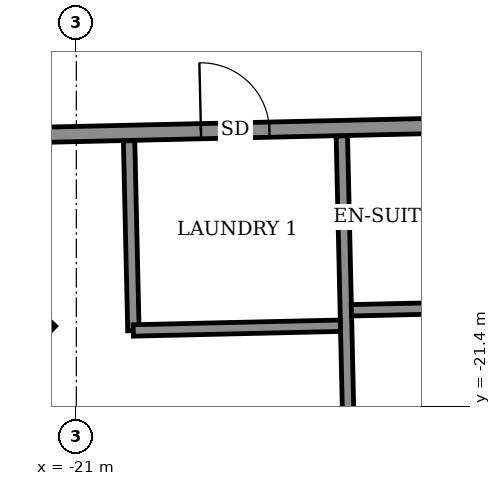
"""IFC4 building model, lengths in metres.
Left out: names, types, materials, properties, quantities, classifications, styles, units other than length and angle.
Written with IfcOpenShell. Run it as: python <this file> out.ifc"""

import sys

from ifc_helpers import new_model, si_unit, direction, frame, frame_2d, origin, origin_2d, place, context, subcontext, project, spatial, rectangle, extrude, element, fill, save


model = new_model("IFC4")
c1 = context("Model", 3, precision=1e-05, world=origin(), true_north=direction((0.0, 1.0)))
c2 = subcontext(c1, "Body", "Model", "MODEL_VIEW")
j1 = project(units=[si_unit("LENGTHUNIT", "METRE"), si_unit("PLANEANGLEUNIT", "RADIAN")], contexts=[c1])
p1 = place(None, origin())
s1 = spatial("IfcSite", under=j1, at=p1, CompositionType="ELEMENT")
p2 = place(p1, origin())
s2 = spatial("IfcBuilding", under=s1, at=p2, CompositionType="ELEMENT")
p3 = place(p2, frame((0.0, 0.0, 140.9)))
s3 = spatial("IfcBuildingStorey", under=s2, at=p3, CompositionType="ELEMENT", Elevation=140.9)
p4 = place(p3, frame((-22.193, -20.362, -0.55), z_axis=(0.0, 0.0, 1.0), x_axis=(0.722994264183, -0.690854032309, 0.0)))
e1 = element("IfcColumn", 1, at=p4, inside=s3, PredefinedType="COLUMN", context=c2, shape_type="SweptSolid", body=[
    extrude(rectangle(XDim=1.3, YDim=1.3, at=origin_2d()), origin(), (0.0, 0.0, 1.0), 3.6),
])
p5 = place(p3, frame((-17.349, -24.813, 0.0), z_axis=(0.0, 0.0, 1.0), x_axis=(-0.022644288452, 0.999743585226, 0.0)))
e2 = element("IfcWall", 2, at=p5, inside=s3, PredefinedType="PARTITIONING", context=c2, shape_type="SweptSolid", body=[
    extrude(rectangle(XDim=6.976, YDim=0.15, at=frame_2d((3.488, 0.0))), origin(), (0.0, 0.0, 1.0), 2.55),
])
p6 = place(p3, frame((-20.249, -20.402, 0.0), z_axis=(0.0, 0.0, 1.0), x_axis=(-0.022756903044, 0.999741028149, 0.0)))
e3 = element("IfcWall", 3, at=p6, inside=s3, PredefinedType="PARTITIONING", context=c2, shape_type="SweptSolid", body=[
    extrude(rectangle(XDim=2.5, YDim=0.15, at=frame_2d((1.25, 0.0))), origin(), (0.0, 0.0, 1.0), 3.05),
])
p7 = place(p3, frame((-20.251, -20.398, 0.0), z_axis=(0.0, 0.0, 1.0), x_axis=(0.999740955847, 0.022760079124, 0.0)))
e4 = element("IfcWall", 4, at=p7, inside=s3, PredefinedType="PARTITIONING", context=c2, shape_type="SweptSolid", body=[
    extrude(rectangle(XDim=2.725, YDim=0.15, at=frame_2d((1.362, 0.0))), origin(), (0.0, 0.0, 1.0), 3.05),
])
p8 = place(p3, frame((-17.382, -20.133, 0.0), z_axis=(0.0, 0.0, 1.0), x_axis=(0.99974053329, 0.022778632478, 0.0)))
e5 = element("IfcWall", 5, at=p8, inside=s3, PredefinedType="PARTITIONING", context=c2, shape_type="SweptSolid", body=[
    extrude(rectangle(XDim=2.326, YDim=0.15, at=frame_2d((1.163, 0.0))), origin(), (0.0, 0.0, 1.0), 3.05),
])
p9 = place(p3, frame((-25.709, -17.921, 0.0), z_axis=(0.0, 0.0, 1.0), x_axis=(0.999742764922, 0.022680475901, 0.0)))
e6 = element("IfcWall", 6, at=p9, inside=s3, PredefinedType="PARTITIONING", context=c2, shape_type="SweptSolid", body=[
    extrude(rectangle(XDim=10.84, YDim=0.2, at=frame_2d((5.42, 0.0))), origin(), (0.0, 0.0, 1.0), 3.05),
])
p10 = place(p9, frame((1.5, 0.0, 0.0)))
e7 = element("IfcOpeningElement", 7, at=p10, cuts=e6, PredefinedType="OPENING", context=c2, shape_type="SweptSolid", body=[
    extrude(rectangle(XDim=1.0, YDim=2.1, at=frame_2d((0.5, 1.05))), frame((0.0, 0.11, 0.0), z_axis=(0.0, -1.0, 0.0), x_axis=(1.0, 0.0, 0.0)), (0.0, 0.0, 1.0), 0.22),
])
p11 = place(p9, frame((6.35, 0.0, 0.0)))
e8 = element("IfcOpeningElement", 8, at=p11, cuts=e6, PredefinedType="OPENING", context=c2, shape_type="SweptSolid", body=[
    extrude(rectangle(XDim=0.9, YDim=2.1, at=frame_2d((0.45, 1.05))), frame((0.0, 0.11, 0.0), z_axis=(0.0, -1.0, 0.0), x_axis=(1.0, 0.0, 0.0)), (0.0, 0.0, 1.0), 0.22),
])
p12 = place(p11, origin())
e9 = element("IfcDoor", 9, at=p12, inside=s3, OperationType="SINGLE_SWING_LEFT", PredefinedType="DOOR", context=c2, shape_type="SweptSolid", body=[
    extrude(rectangle(XDim=0.9, YDim=2.1, at=frame_2d((0.45, 1.05))), frame((0.0, 0.025, 0.0), z_axis=(0.0, -1.0, 0.0), x_axis=(1.0, 0.0, 0.0)), (0.0, 0.0, 1.0), 0.05),
])
fill(e8, e9)
save(model, sys.argv[1])
